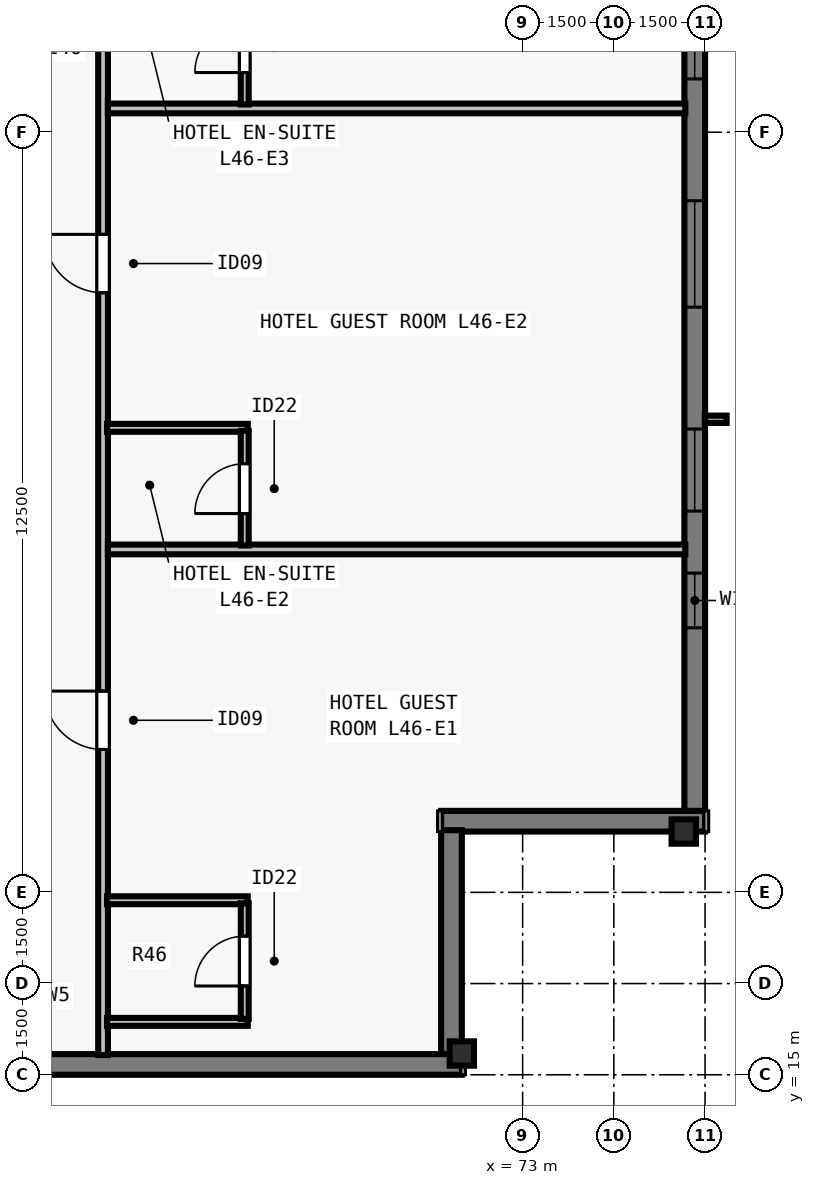
"""IFC4 building model, lengths in metres.
Left out: names, types, materials, properties, quantities, classifications, styles, units other than length and angle.
Written with IfcOpenShell. Run it as: python <this file> out.ifc"""

import sys

from ifc_helpers import new_model, si_unit, direction, frame, frame_2d, origin, origin_2d, place, context, subcontext, project, spatial, rectangle, i_section, extrude, element, fill, save


model = new_model("IFC4")
c1 = context("Model", 3, precision=1e-05, world=origin(), true_north=direction((0.0, 1.0)))
c2 = subcontext(c1, "Body", "Model", "MODEL_VIEW")
j1 = project(units=[si_unit("LENGTHUNIT", "METRE"), si_unit("PLANEANGLEUNIT", "RADIAN")], contexts=[c1])
p1 = place(None, origin())
s1 = spatial("IfcSite", under=j1, at=p1, CompositionType="ELEMENT")
p2 = place(p1, origin())
s2 = spatial("IfcBuilding", under=s1, at=p2, CompositionType="ELEMENT")
p3 = place(p2, frame((0.0, 0.0, 169.0)))
s3 = spatial("IfcBuildingStorey", under=s2, at=p3, CompositionType="ELEMENT", Elevation=169.0)
for number, where, z_axis, x_axis in (
    (1, (72.0, 15.35, 0.0), (0.0, 0.0, 1.0), (1.0, 0.0, 0.0)),
    (2, (75.65, 19.0, 0.0), (0.0, 0.0, 1.0), (0.0, 1.0, 0.0)),
):
    element("IfcColumn", number, at=place(p3, frame(where, z_axis=z_axis, x_axis=x_axis)), inside=s3, PredefinedType="COLUMN", context=c2, shape_type="SweptSolid", body=[
        extrude(i_section(OverallWidth=0.4, OverallDepth=0.4, WebThickness=0.022, FlangeThickness=0.036, at=origin_2d()), origin(), (0.0, 0.0, 1.0), 3.5),
    ])
p4 = place(p3, frame((75.83, 59.0, 0.0), z_axis=(0.0, 0.0, 1.0), x_axis=(0.0, -1.0, 0.0)))
e3 = element("IfcWall", 3, at=p4, inside=s3, PredefinedType="SOLIDWALL", context=c2, shape_type="SweptSolid", body=[
    extrude(rectangle(XDim=39.682, YDim=0.34, at=frame_2d((19.841, 0.0))), origin(), (0.0, 0.0, 1.0), 3.28),
])
p5 = place(p4, frame((4.952, 0.0, 0.8)))
e4 = element("IfcOpeningElement", 4, at=p5, cuts=e3, PredefinedType="OPENING", context=c2, shape_type="SweptSolid", body=[
    extrude(rectangle(XDim=1.35, YDim=1.66, at=frame_2d((0.675, 0.83))), frame((0.0, 0.18, 0.0), z_axis=(0.0, -1.0, 0.0), x_axis=(1.0, 0.0, 0.0)), (0.0, 0.0, 1.0), 0.36),
])
p6 = place(p4, frame((8.305, 0.0, 0.8)))
e5 = element("IfcOpeningElement", 5, at=p6, cuts=e3, PredefinedType="OPENING", context=c2, shape_type="SweptSolid", body=[
    extrude(rectangle(XDim=1.75, YDim=1.66, at=frame_2d((0.875, 0.83))), frame((0.0, 0.18, 0.0), z_axis=(0.0, -1.0, 0.0), x_axis=(1.0, 0.0, 0.0)), (0.0, 0.0, 1.0), 0.36),
])
p7 = place(p4, frame((12.909, 0.0, 0.8)))
e6 = element("IfcOpeningElement", 6, at=p7, cuts=e3, PredefinedType="OPENING", context=c2, shape_type="SweptSolid", body=[
    extrude(rectangle(XDim=1.35, YDim=1.66, at=frame_2d((0.675, 0.83))), frame((0.0, 0.18, 0.0), z_axis=(0.0, -1.0, 0.0), x_axis=(1.0, 0.0, 0.0)), (0.0, 0.0, 1.0), 0.36),
])
p8 = place(p4, frame((16.262, 0.0, 0.8)))
e7 = element("IfcOpeningElement", 7, at=p8, cuts=e3, PredefinedType="OPENING", context=c2, shape_type="SweptSolid", body=[
    extrude(rectangle(XDim=1.75, YDim=1.66, at=frame_2d((0.875, 0.83))), frame((0.0, 0.18, 0.0), z_axis=(0.0, -1.0, 0.0), x_axis=(1.0, 0.0, 0.0)), (0.0, 0.0, 1.0), 0.36),
])
p9 = place(p4, frame((20.016, 0.0, 0.8)))
e8 = element("IfcOpeningElement", 8, at=p9, cuts=e3, PredefinedType="OPENING", context=c2, shape_type="SweptSolid", body=[
    extrude(rectangle(XDim=1.35, YDim=1.66, at=frame_2d((0.675, 0.83))), frame((0.0, 0.18, 0.0), z_axis=(0.0, -1.0, 0.0), x_axis=(1.0, 0.0, 0.0)), (0.0, 0.0, 1.0), 0.36),
])
p10 = place(p4, frame((22.07, 0.0, 0.8)))
e9 = element("IfcOpeningElement", 9, at=p10, cuts=e3, PredefinedType="OPENING", context=c2, shape_type="SweptSolid", body=[
    extrude(rectangle(XDim=1.75, YDim=1.66, at=frame_2d((0.875, 0.83))), frame((0.0, 0.18, 0.0), z_axis=(0.0, -1.0, 0.0), x_axis=(1.0, 0.0, 0.0)), (0.0, 0.0, 1.0), 0.36),
])
p11 = place(p4, frame((26.273, 0.0, 0.8)))
e10 = element("IfcOpeningElement", 10, at=p11, cuts=e3, PredefinedType="OPENING", context=c2, shape_type="SweptSolid", body=[
    extrude(rectangle(XDim=1.35, YDim=1.66, at=frame_2d((0.675, 0.83))), frame((0.0, 0.18, 0.0), z_axis=(0.0, -1.0, 0.0), x_axis=(1.0, 0.0, 0.0)), (0.0, 0.0, 1.0), 0.36),
])
p12 = place(p4, frame((29.627, 0.0, 0.8)))
e11 = element("IfcOpeningElement", 11, at=p12, cuts=e3, PredefinedType="OPENING", context=c2, shape_type="SweptSolid", body=[
    extrude(rectangle(XDim=1.75, YDim=1.66, at=frame_2d((0.875, 0.83))), frame((0.0, 0.18, 0.0), z_axis=(0.0, -1.0, 0.0), x_axis=(1.0, 0.0, 0.0)), (0.0, 0.0, 1.0), 0.36),
])
p13 = place(p4, frame((33.38, 0.0, 0.8)))
e12 = element("IfcOpeningElement", 12, at=p13, cuts=e3, PredefinedType="OPENING", context=c2, shape_type="SweptSolid", body=[
    extrude(rectangle(XDim=1.35, YDim=1.66, at=frame_2d((0.675, 0.83))), frame((0.0, 0.18, 0.0), z_axis=(0.0, -1.0, 0.0), x_axis=(1.0, 0.0, 0.0)), (0.0, 0.0, 1.0), 0.36),
])
p14 = place(p4, frame((35.75, 0.0, 0.8)))
e13 = element("IfcOpeningElement", 13, at=p14, cuts=e3, PredefinedType="OPENING", context=c2, shape_type="SweptSolid", body=[
    extrude(rectangle(XDim=0.9, YDim=1.66, at=frame_2d((0.45, 0.83))), frame((0.0, 0.18, 0.0), z_axis=(0.0, -1.0, 0.0), x_axis=(1.0, 0.0, 0.0)), (0.0, 0.0, 1.0), 0.36),
])
p15 = place(p3, frame((76.0, 19.17, 0.0), z_axis=(0.0, 0.0, 1.0), x_axis=(-1.0, 0.0, 0.0)))
e14 = element("IfcWall", 14, at=p15, inside=s3, PredefinedType="SOLIDWALL", context=c2, shape_type="SweptSolid", body=[
    extrude(rectangle(XDim=4.34, YDim=0.34, at=frame_2d((2.17, 0.0))), origin(), (0.0, 0.0, 1.0), 3.28),
])
p16 = place(p3, frame((71.83, 19.022, 0.0), z_axis=(0.0, 0.0, 1.0), x_axis=(0.0, -1.0, 0.0)))
e15 = element("IfcWall", 15, at=p16, inside=s3, PredefinedType="SOLIDWALL", context=c2, shape_type="SweptSolid", body=[
    extrude(rectangle(XDim=3.704, YDim=0.34, at=frame_2d((1.852, 0.0))), origin(), (0.0, 0.0, 1.0), 3.28),
])
p17 = place(p3, frame((72.0, 15.17, 0.0), z_axis=(0.0, 0.0, 1.0), x_axis=(-1.0, 0.0, 0.0)))
e16 = element("IfcWall", 16, at=p17, inside=s3, PredefinedType="SOLIDWALL", context=c2, shape_type="SweptSolid", body=[
    extrude(rectangle(XDim=7.282, YDim=0.34, at=frame_2d((3.641, 0.0))), origin(), (0.0, 0.0, 1.0), 3.28),
])
p18 = place(p3, frame((66.1, 15.325, 0.0), z_axis=(0.0, 0.0, 1.0), x_axis=(0.0, 1.0, 0.0)))
e17 = element("IfcWall", 17, at=p18, inside=s3, PredefinedType="PARTITIONING", context=c2, shape_type="SweptSolid", body=[
    extrude(rectangle(XDim=47.35, YDim=0.16, at=frame_2d((23.675, 0.0))), origin(), (0.0, 0.0, 1.0), 2.555),
])
p19 = place(p18, frame((5.025, 0.0, 0.0)))
e18 = element("IfcOpeningElement", 18, at=p19, cuts=e17, PredefinedType="OPENING", context=c2, shape_type="SweptSolid", body=[
    extrude(rectangle(XDim=0.96, YDim=2.15, at=frame_2d((0.48, 1.075))), frame((0.0, 0.09, 0.0), z_axis=(0.0, -1.0, 0.0), x_axis=(1.0, 0.0, 0.0)), (0.0, 0.0, 1.0), 0.18),
])
p20 = place(p18, frame((12.535, 0.0, 0.0)))
e19 = element("IfcOpeningElement", 19, at=p20, cuts=e17, PredefinedType="OPENING", context=c2, shape_type="SweptSolid", body=[
    extrude(rectangle(XDim=0.96, YDim=2.15, at=frame_2d((0.48, 1.075))), frame((0.0, 0.09, 0.0), z_axis=(0.0, -1.0, 0.0), x_axis=(1.0, 0.0, 0.0)), (0.0, 0.0, 1.0), 0.18),
])
p21 = place(p18, frame((20.395, 0.0, 0.0)))
e20 = element("IfcOpeningElement", 20, at=p21, cuts=e17, PredefinedType="OPENING", context=c2, shape_type="SweptSolid", body=[
    extrude(rectangle(XDim=0.96, YDim=2.15, at=frame_2d((0.48, 1.075))), frame((0.0, 0.09, 0.0), z_axis=(0.0, -1.0, 0.0), x_axis=(1.0, 0.0, 0.0)), (0.0, 0.0, 1.0), 0.18),
])
p22 = place(p18, frame((28.255, 0.0, 0.0)))
e21 = element("IfcOpeningElement", 21, at=p22, cuts=e17, PredefinedType="OPENING", context=c2, shape_type="SweptSolid", body=[
    extrude(rectangle(XDim=0.96, YDim=2.15, at=frame_2d((0.48, 1.075))), frame((0.0, 0.09, 0.0), z_axis=(0.0, -1.0, 0.0), x_axis=(1.0, 0.0, 0.0)), (0.0, 0.0, 1.0), 0.18),
])
p23 = place(p18, frame((36.115, 0.0, 0.0)))
e22 = element("IfcOpeningElement", 22, at=p23, cuts=e17, PredefinedType="OPENING", context=c2, shape_type="SweptSolid", body=[
    extrude(rectangle(XDim=0.96, YDim=2.15, at=frame_2d((0.48, 1.075))), frame((0.0, 0.09, 0.0), z_axis=(0.0, -1.0, 0.0), x_axis=(1.0, 0.0, 0.0)), (0.0, 0.0, 1.0), 0.18),
])
p24 = place(p18, frame((44.1, 0.0, 0.0)))
e23 = element("IfcOpeningElement", 23, at=p24, cuts=e17, PredefinedType="OPENING", context=c2, shape_type="SweptSolid", body=[
    extrude(rectangle(XDim=0.96, YDim=2.15, at=frame_2d((0.48, 1.075))), frame((0.0, 0.09, 0.0), z_axis=(0.0, -1.0, 0.0), x_axis=(1.0, 0.0, 0.0)), (0.0, 0.0, 1.0), 0.18),
])
for number, where, z_axis, x_axis in (
    (24, (66.165, 15.87, 0.0), (0.0, 0.0, 1.0), (1.0, 0.0, 0.0)),
    (25, (66.165, 17.87, 0.0), (0.0, 0.0, 1.0), (1.0, 0.0, 0.0)),
):
    element("IfcWall", number, at=place(p3, frame(where, z_axis=z_axis, x_axis=x_axis)), inside=s3, PredefinedType="PLUMBINGWALL", context=c2, shape_type="SweptSolid", body=[
        extrude(rectangle(XDim=2.315, YDim=0.13, at=frame_2d((1.157, 0.0))), origin(), (0.0, 0.0, 1.0), 3.28),
    ])
p25 = place(p3, frame((68.43, 15.92, 0.0), z_axis=(0.0, 0.0, 1.0), x_axis=(0.0, 1.0, 0.0)))
e26 = element("IfcWall", 26, at=p25, inside=s3, PredefinedType="PLUMBINGWALL", context=c2, shape_type="SweptSolid", body=[
    extrude(rectangle(XDim=1.9, YDim=0.13, at=frame_2d((0.95, 0.0))), origin(), (0.0, 0.0, 1.0), 3.28),
])
p26 = place(p25, frame((0.54, 0.0, 0.0)))
e27 = element("IfcOpeningElement", 27, at=p26, cuts=e26, PredefinedType="OPENING", context=c2, shape_type="SweptSolid", body=[
    extrude(rectangle(XDim=0.82, YDim=2.1, at=frame_2d((0.41, 1.05))), frame((0.0, 0.075, 0.0), z_axis=(0.0, -1.0, 0.0), x_axis=(1.0, 0.0, 0.0)), (0.0, 0.0, 1.0), 0.15),
])
p27 = place(p3, frame((66.18, 23.639, 0.0), z_axis=(0.0, 0.0, 1.0), x_axis=(1.0, 0.0, 0.0)))
e28 = element("IfcWall", 28, at=p27, inside=s3, PredefinedType="PARTITIONING", context=c2, shape_type="SweptSolid", body=[
    extrude(rectangle(XDim=9.495, YDim=0.16, at=frame_2d((4.748, 0.0))), origin(), (0.0, 0.0, 1.0), 2.896),
])
p28 = place(p3, frame((66.165, 25.639, 0.0), z_axis=(0.0, 0.0, 1.0), x_axis=(1.0, 0.0, 0.0)))
e29 = element("IfcWall", 29, at=p28, inside=s3, PredefinedType="PLUMBINGWALL", context=c2, shape_type="SweptSolid", body=[
    extrude(rectangle(XDim=2.315, YDim=0.13, at=frame_2d((1.157, 0.0))), origin(), (0.0, 0.0, 1.0), 2.896),
])
p29 = place(p3, frame((68.43, 23.704, 0.0), z_axis=(0.0, 0.0, 1.0), x_axis=(0.0, 1.0, 0.0)))
e30 = element("IfcWall", 30, at=p29, inside=s3, PredefinedType="PLUMBINGWALL", context=c2, shape_type="SweptSolid", body=[
    extrude(rectangle(XDim=1.885, YDim=0.13, at=frame_2d((0.942, 0.0))), origin(), (0.0, 0.0, 1.0), 3.28),
])
p30 = place(p29, frame((0.525, 0.0, 0.0)))
e31 = element("IfcOpeningElement", 31, at=p30, cuts=e30, PredefinedType="OPENING", context=c2, shape_type="SweptSolid", body=[
    extrude(rectangle(XDim=0.82, YDim=2.1, at=frame_2d((0.41, 1.05))), frame((0.0, 0.075, 0.0), z_axis=(0.0, -1.0, 0.0), x_axis=(1.0, 0.0, 0.0)), (0.0, 0.0, 1.0), 0.15),
])
p31 = place(p3, frame((66.18, 30.891, 0.0), z_axis=(0.0, 0.0, 1.0), x_axis=(1.0, 0.0, 0.0)))
e32 = element("IfcWall", 32, at=p31, inside=s3, PredefinedType="PARTITIONING", context=c2, shape_type="SweptSolid", body=[
    extrude(rectangle(XDim=9.495, YDim=0.16, at=frame_2d((4.748, 0.0))), origin(), (0.0, 0.0, 1.0), 3.28),
])
p32 = place(p3, frame((68.43, 30.956, 0.0), z_axis=(0.0, 0.0, 1.0), x_axis=(0.0, 1.0, 0.0)))
e33 = element("IfcWall", 33, at=p32, inside=s3, PredefinedType="PLUMBINGWALL", context=c2, shape_type="SweptSolid", body=[
    extrude(rectangle(XDim=1.885, YDim=0.13, at=frame_2d((0.942, 0.0))), origin(), (0.0, 0.0, 1.0), 3.28),
])
p33 = place(p32, frame((0.525, 0.0, 0.0)))
e34 = element("IfcOpeningElement", 34, at=p33, cuts=e33, PredefinedType="OPENING", context=c2, shape_type="SweptSolid", body=[
    extrude(rectangle(XDim=0.82, YDim=2.1, at=frame_2d((0.41, 1.05))), frame((0.0, 0.075, 0.0), z_axis=(0.0, -1.0, 0.0), x_axis=(1.0, 0.0, 0.0)), (0.0, 0.0, 1.0), 0.15),
])
p34 = place(p11, origin())
e35 = element("IfcWindow", 35, at=p34, inside=s3, PartitioningType="SINGLE_PANEL", PredefinedType="WINDOW", context=c2, shape_type="SweptSolid", body=[
    extrude(rectangle(XDim=1.35, YDim=1.66, at=frame_2d((0.675, 0.83))), frame((0.0, -0.05, 0.0), z_axis=(0.0, -1.0, 0.0), x_axis=(1.0, 0.0, 0.0)), (0.0, 0.0, 1.0), 0.06),
])
fill(e10, e35)
p35 = place(p12, origin())
e36 = element("IfcWindow", 36, at=p35, inside=s3, PartitioningType="SINGLE_PANEL", PredefinedType="WINDOW", context=c2, shape_type="SweptSolid", body=[
    extrude(rectangle(XDim=1.75, YDim=1.66, at=frame_2d((0.875, 0.83))), frame((0.0, -0.05, 0.0), z_axis=(0.0, -1.0, 0.0), x_axis=(1.0, 0.0, 0.0)), (0.0, 0.0, 1.0), 0.06),
])
fill(e11, e36)
p36 = place(p13, origin())
e37 = element("IfcWindow", 37, at=p36, inside=s3, PartitioningType="SINGLE_PANEL", PredefinedType="WINDOW", context=c2, shape_type="SweptSolid", body=[
    extrude(rectangle(XDim=1.35, YDim=1.66, at=frame_2d((0.675, 0.83))), frame((0.0, -0.05, 0.0), z_axis=(0.0, -1.0, 0.0), x_axis=(1.0, 0.0, 0.0)), (0.0, 0.0, 1.0), 0.06),
])
fill(e12, e37)
p37 = place(p14, origin())
e38 = element("IfcWindow", 38, at=p37, inside=s3, PartitioningType="SINGLE_PANEL", PredefinedType="WINDOW", context=c2, shape_type="SweptSolid", body=[
    extrude(rectangle(XDim=0.9, YDim=1.66, at=frame_2d((0.45, 0.83))), frame((0.0, -0.04, 0.0), z_axis=(0.0, -1.0, 0.0), x_axis=(1.0, 0.0, 0.0)), (0.0, 0.0, 1.0), 0.06),
])
fill(e13, e38)
p38 = place(p26, origin())
e39 = element("IfcDoor", 39, at=p38, inside=s3, OperationType="SINGLE_SWING_LEFT", PredefinedType="DOOR", context=c2, shape_type="SweptSolid", body=[
    extrude(rectangle(XDim=0.82, YDim=2.1, at=frame_2d((0.41, 1.05))), frame((0.0, 0.025, 0.0), z_axis=(0.0, -1.0, 0.0), x_axis=(1.0, 0.0, 0.0)), (0.0, 0.0, 1.0), 0.05),
])
fill(e27, e39)
p39 = place(p19, origin())
e40 = element("IfcDoor", 40, at=p39, inside=s3, OperationType="SINGLE_SWING_RIGHT", PredefinedType="DOOR", context=c2, shape_type="SweptSolid", body=[
    extrude(rectangle(XDim=0.96, YDim=2.15, at=frame_2d((0.48, 1.075))), frame((0.0, 0.025, 0.0), z_axis=(0.0, -1.0, 0.0), x_axis=(1.0, 0.0, 0.0)), (0.0, 0.0, 1.0), 0.05),
])
fill(e18, e40)
p40 = place(p30, origin())
e41 = element("IfcDoor", 41, at=p40, inside=s3, OperationType="SINGLE_SWING_LEFT", PredefinedType="DOOR", context=c2, shape_type="SweptSolid", body=[
    extrude(rectangle(XDim=0.82, YDim=2.1, at=frame_2d((0.41, 1.05))), frame((0.0, 0.025, 0.0), z_axis=(0.0, -1.0, 0.0), x_axis=(1.0, 0.0, 0.0)), (0.0, 0.0, 1.0), 0.05),
])
fill(e31, e41)
p41 = place(p20, origin())
e42 = element("IfcDoor", 42, at=p41, inside=s3, OperationType="SINGLE_SWING_RIGHT", PredefinedType="DOOR", context=c2, shape_type="SweptSolid", body=[
    extrude(rectangle(XDim=0.96, YDim=2.15, at=frame_2d((0.48, 1.075))), frame((0.0, 0.025, 0.0), z_axis=(0.0, -1.0, 0.0), x_axis=(1.0, 0.0, 0.0)), (0.0, 0.0, 1.0), 0.05),
])
fill(e19, e42)
p42 = place(p33, origin())
e43 = element("IfcDoor", 43, at=p42, inside=s3, OperationType="SINGLE_SWING_LEFT", PredefinedType="DOOR", context=c2, shape_type="SweptSolid", body=[
    extrude(rectangle(XDim=0.82, YDim=2.1, at=frame_2d((0.41, 1.05))), frame((0.0, 0.025, 0.0), z_axis=(0.0, -1.0, 0.0), x_axis=(1.0, 0.0, 0.0)), (0.0, 0.0, 1.0), 0.05),
])
fill(e34, e43)
save(model, sys.argv[1])
